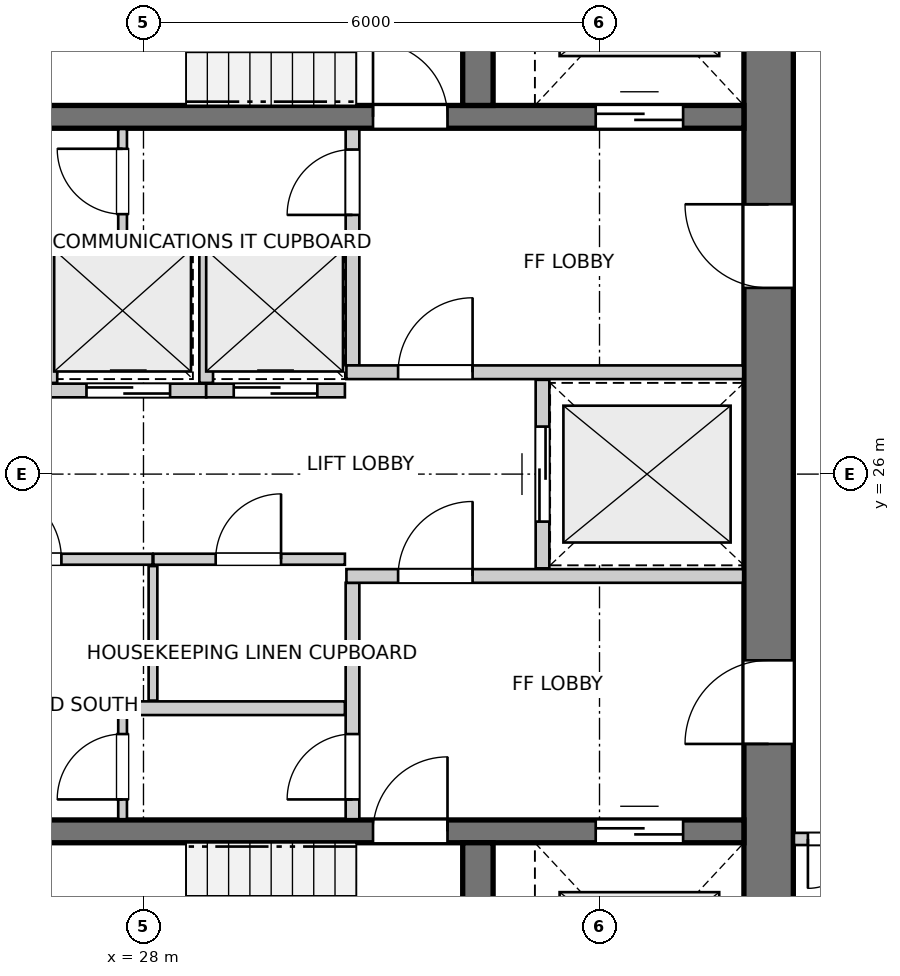
"""IFC4 building model, lengths in metres.
Left out: names, types, materials, properties, quantities, classifications, styles, units other than length and angle.
Written with IfcOpenShell. Run it as: python <this file> out.ifc"""

import sys

from ifc_helpers import new_model, si_unit, direction, frame, frame_2d, origin, place, context, subcontext, project, spatial, rectangle, extrude, source, transform, mapped, element, fill, save


model = new_model("IFC4")
c1 = context("Model", 3, precision=1e-05, world=origin(), true_north=direction((0.0, 1.0)))
c2 = subcontext(c1, "Body", "Model", "MODEL_VIEW")
j1 = project(units=[si_unit("LENGTHUNIT", "METRE"), si_unit("PLANEANGLEUNIT", "RADIAN")], contexts=[c1])
p1 = place(None, origin())
s1 = spatial("IfcSite", under=j1, at=p1, CompositionType="ELEMENT")
p2 = place(p1, origin())
s2 = spatial("IfcBuilding", under=s1, at=p2, CompositionType="ELEMENT")
p3 = place(p2, frame((0.0, 0.0, 142.6)))
s3 = spatial("IfcBuildingStorey", under=s2, at=p3, CompositionType="ELEMENT", Elevation=142.6)
p4 = place(p3, frame((36.225, 18.2, 0.0), z_axis=(0.0, 0.0, 1.0), x_axis=(0.0, 1.0, 0.0)))
e1 = element("IfcWall", 1, at=p4, inside=s3, PredefinedType="SHEAR", context=c2, shape_type="SweptSolid", body=[
    extrude(rectangle(XDim=15.6, YDim=0.65, at=frame_2d((7.8, 0.0))), origin(), (0.0, 0.0, 1.0), 2.95),
])
p5 = place(p4, frame((4.25, 0.0, 0.0)))
e2 = element("IfcOpeningElement", 2, at=p5, cuts=e1, PredefinedType="OPENING", context=c2, shape_type="SweptSolid", body=[
    extrude(rectangle(XDim=1.1, YDim=2.15, at=frame_2d((0.55, 1.075))), frame((0.0, 0.335, 0.0), z_axis=(0.0, -1.0, 0.0), x_axis=(1.0, 0.0, 0.0)), (0.0, 0.0, 1.0), 0.67),
])
p6 = place(p4, frame((10.25, 0.0, 0.0)))
e3 = element("IfcOpeningElement", 3, at=p6, cuts=e1, PredefinedType="OPENING", context=c2, shape_type="SweptSolid", body=[
    extrude(rectangle(XDim=1.1, YDim=2.15, at=frame_2d((0.55, 1.075))), frame((0.0, 0.335, 0.0), z_axis=(0.0, -1.0, 0.0), x_axis=(1.0, 0.0, 0.0)), (0.0, 0.0, 1.0), 0.67),
])
p7 = place(p3, frame((24.8, 21.3, 0.0), z_axis=(0.0, 0.0, 1.0), x_axis=(1.0, 0.0, 0.0)))
e4 = element("IfcWall", 4, at=p7, inside=s3, PredefinedType="SHEAR", context=c2, shape_type="SweptSolid", body=[
    extrude(rectangle(XDim=11.1, YDim=0.3, at=frame_2d((5.55, 0.0))), origin(), (0.0, 0.0, 1.0), 2.95),
])
p8 = place(p7, frame((6.22, 0.0, 0.0)))
e5 = element("IfcOpeningElement", 5, at=p8, cuts=e4, PredefinedType="OPENING", context=c2, shape_type="SweptSolid", body=[
    extrude(rectangle(XDim=0.98, YDim=2.15, at=frame_2d((0.49, 1.075))), frame((0.0, 0.16, 0.0), z_axis=(0.0, -1.0, 0.0), x_axis=(1.0, 0.0, 0.0)), (0.0, 0.0, 1.0), 0.32),
])
p9 = place(p7, frame((9.15, 0.0, 0.0)))
e6 = element("IfcOpeningElement", 6, at=p9, cuts=e4, PredefinedType="OPENING", context=c2, shape_type="SweptSolid", body=[
    extrude(rectangle(XDim=1.15, YDim=2.15, at=frame_2d((0.575, 1.075))), frame((0.0, 0.16, 0.0), z_axis=(0.0, -1.0, 0.0), x_axis=(1.0, 0.0, 0.0)), (0.0, 0.0, 1.0), 0.32),
])
p10 = place(p3, frame((32.4, 18.2, 0.0), z_axis=(0.0, 0.0, 1.0), x_axis=(0.0, 1.0, 0.0)))
e7 = element("IfcWall", 7, at=p10, inside=s3, PredefinedType="SHEAR", context=c2, shape_type="SweptSolid", body=[
    extrude(rectangle(XDim=2.95, YDim=0.4, at=frame_2d((1.475, 0.0))), origin(), (0.0, 0.0, 1.0), 2.95),
])
p11 = place(p3, frame((24.8, 30.7, 0.0), z_axis=(0.0, 0.0, 1.0), x_axis=(1.0, 0.0, 0.0)))
e8 = element("IfcWall", 8, at=p11, inside=s3, PredefinedType="SHEAR", context=c2, shape_type="SweptSolid", body=[
    extrude(rectangle(XDim=11.1, YDim=0.3, at=frame_2d((5.55, 0.0))), origin(), (0.0, 0.0, 1.0), 2.95),
])
p12 = place(p11, frame((6.22, 0.0, 0.0)))
e9 = element("IfcOpeningElement", 9, at=p12, cuts=e8, PredefinedType="OPENING", context=c2, shape_type="SweptSolid", body=[
    extrude(rectangle(XDim=0.98, YDim=2.15, at=frame_2d((0.49, 1.075))), frame((0.0, 0.16, 0.0), z_axis=(0.0, -1.0, 0.0), x_axis=(1.0, 0.0, 0.0)), (0.0, 0.0, 1.0), 0.32),
])
p13 = place(p11, frame((9.15, 0.0, 0.0)))
e10 = element("IfcOpeningElement", 10, at=p13, cuts=e8, PredefinedType="OPENING", context=c2, shape_type="SweptSolid", body=[
    extrude(rectangle(XDim=1.15, YDim=2.15, at=frame_2d((0.575, 1.075))), frame((0.0, 0.16, 0.0), z_axis=(0.0, -1.0, 0.0), x_axis=(1.0, 0.0, 0.0)), (0.0, 0.0, 1.0), 0.32),
])
p14 = place(p3, frame((32.4, 30.85, 0.0), z_axis=(0.0, 0.0, 1.0), x_axis=(0.0, 1.0, 0.0)))
e11 = element("IfcWall", 11, at=p14, inside=s3, PredefinedType="SHEAR", context=c2, shape_type="SweptSolid", body=[
    extrude(rectangle(XDim=2.95, YDim=0.4, at=frame_2d((1.475, 0.0))), origin(), (0.0, 0.0, 1.0), 2.95),
])
p15 = place(p3, frame((30.75, 21.46, 0.0), z_axis=(0.0, 0.0, 1.0), x_axis=(0.0, 1.0, 0.0)))
e12 = element("IfcWall", 12, at=p15, inside=s3, PredefinedType="PARTITIONING", context=c2, shape_type="SweptSolid", body=[
    extrude(rectangle(XDim=3.11, YDim=0.18, at=frame_2d((1.555, 0.0))), origin(), (0.0, 0.0, 1.0), 2.95),
])
p16 = place(p15, frame((0.26, 0.0, 0.0)))
e13 = element("IfcOpeningElement", 13, at=p16, cuts=e12, PredefinedType="OPENING", context=c2, shape_type="SweptSolid", body=[
    extrude(rectangle(XDim=0.86, YDim=2.05, at=frame_2d((0.43, 1.025))), frame((0.0, 0.1, 0.0), z_axis=(0.0, -1.0, 0.0), x_axis=(1.0, 0.0, 0.0)), (0.0, 0.0, 1.0), 0.2),
])
p17 = place(p3, frame((30.67, 24.66, 0.0), z_axis=(0.0, 0.0, 1.0), x_axis=(1.0, 0.0, 0.0)))
e14 = element("IfcWall", 14, at=p17, inside=s3, PredefinedType="PARTITIONING", context=c2, shape_type="SweptSolid", body=[
    extrude(rectangle(XDim=5.22, YDim=0.18, at=frame_2d((2.61, 0.0))), origin(), (0.0, 0.0, 1.0), 2.95),
])
p18 = place(p17, frame((0.68, 0.0, 0.0)))
e15 = element("IfcOpeningElement", 15, at=p18, cuts=e14, PredefinedType="OPENING", context=c2, shape_type="SweptSolid", body=[
    extrude(rectangle(XDim=0.98, YDim=2.15, at=frame_2d((0.49, 1.075))), frame((0.0, 0.1, 0.0), z_axis=(0.0, -1.0, 0.0), x_axis=(1.0, 0.0, 0.0)), (0.0, 0.0, 1.0), 0.2),
])
p19 = place(p3, frame((30.75, 27.43, 0.0), z_axis=(0.0, 0.0, 1.0), x_axis=(0.0, 1.0, 0.0)))
e16 = element("IfcWall", 16, at=p19, inside=s3, PredefinedType="PARTITIONING", context=c2, shape_type="SweptSolid", body=[
    extrude(rectangle(XDim=3.11, YDim=0.18, at=frame_2d((1.555, 0.0))), origin(), (0.0, 0.0, 1.0), 2.95),
])
p20 = place(p19, frame((1.98, 0.0, 0.0)))
e17 = element("IfcOpeningElement", 17, at=p20, cuts=e16, PredefinedType="OPENING", context=c2, shape_type="SweptSolid", body=[
    extrude(rectangle(XDim=0.86, YDim=2.05, at=frame_2d((0.43, 1.025))), frame((0.0, 0.1, 0.0), z_axis=(0.0, -1.0, 0.0), x_axis=(1.0, 0.0, 0.0)), (0.0, 0.0, 1.0), 0.2),
])
p21 = place(p3, frame((30.67, 27.34, 0.0), z_axis=(0.0, 0.0, 1.0), x_axis=(1.0, 0.0, 0.0)))
e18 = element("IfcWall", 18, at=p21, inside=s3, PredefinedType="PARTITIONING", context=c2, shape_type="SweptSolid", body=[
    extrude(rectangle(XDim=5.22, YDim=0.18, at=frame_2d((2.61, 0.0))), origin(), (0.0, 0.0, 1.0), 2.95),
])
p22 = place(p21, frame((0.68, 0.0, 0.0)))
e19 = element("IfcOpeningElement", 19, at=p22, cuts=e18, PredefinedType="OPENING", context=c2, shape_type="SweptSolid", body=[
    extrude(rectangle(XDim=0.98, YDim=2.15, at=frame_2d((0.49, 1.075))), frame((0.0, 0.1, 0.0), z_axis=(0.0, -1.0, 0.0), x_axis=(1.0, 0.0, 0.0)), (0.0, 0.0, 1.0), 0.2),
])
p23 = place(p3, frame((33.25, 24.76, 0.0), z_axis=(0.0, 0.0, 1.0), x_axis=(0.0, 1.0, 0.0)))
e20 = element("IfcWall", 20, at=p23, inside=s3, PredefinedType="PARTITIONING", context=c2, shape_type="SweptSolid", body=[
    extrude(rectangle(XDim=2.48, YDim=0.18, at=frame_2d((1.24, 0.0))), origin(), (0.0, 0.0, 1.0), 2.95),
])
p24 = place(p23, frame((0.615, 0.0, 0.0)))
e21 = element("IfcOpeningElement", 21, at=p24, cuts=e20, PredefinedType="OPENING", context=c2, shape_type="SweptSolid", body=[
    extrude(rectangle(XDim=1.25, YDim=2.15, at=frame_2d((0.625, 1.075))), frame((0.0, 0.1, 0.0), z_axis=(0.0, -1.0, 0.0), x_axis=(1.0, 0.0, 0.0)), (0.0, 0.0, 1.0), 0.2),
])
p25 = place(p3, frame((24.81, 22.92, 0.0), z_axis=(0.0, 0.0, 1.0), x_axis=(1.0, 0.0, 0.0)))
e22 = element("IfcWall", 22, at=p25, inside=s3, PredefinedType="PARTITIONING", context=c2, shape_type="SweptSolid", body=[
    extrude(rectangle(XDim=5.84, YDim=0.18, at=frame_2d((2.92, 0.0))), origin(), (0.0, 0.0, 1.0), 2.95),
])
p26 = place(p3, frame((24.81, 24.88, 0.0), z_axis=(0.0, 0.0, 1.0), x_axis=(1.0, 0.0, 0.0)))
e23 = element("IfcWall", 23, at=p26, inside=s3, PredefinedType="PARTITIONING", context=c2, shape_type="SweptSolid", body=[
    extrude(rectangle(XDim=3.31, YDim=0.145, at=frame_2d((1.655, 0.0))), origin(), (0.0, 0.0, 1.0), 2.95),
])
p27 = place(p26, frame((1.15, 0.0, 0.0)))
e24 = element("IfcOpeningElement", 24, at=p27, cuts=e23, PredefinedType="OPENING", context=c2, shape_type="SweptSolid", body=[
    extrude(rectangle(XDim=0.96, YDim=2.1, at=frame_2d((0.48, 1.05))), frame((0.0, 0.083, 0.0), z_axis=(0.0, -1.0, 0.0), x_axis=(1.0, 0.0, 0.0)), (0.0, 0.0, 1.0), 0.165),
])
p28 = place(p3, frame((28.13, 24.88, 0.0), z_axis=(0.0, 0.0, 1.0), x_axis=(1.0, 0.0, 0.0)))
e25 = element("IfcWall", 25, at=p28, inside=s3, PredefinedType="PARTITIONING", context=c2, shape_type="SweptSolid", body=[
    extrude(rectangle(XDim=2.52, YDim=0.145, at=frame_2d((1.26, 0.0))), origin(), (0.0, 0.0, 1.0), 2.95),
])
p29 = place(p28, frame((0.82, 0.0, 0.0)))
e26 = element("IfcOpeningElement", 26, at=p29, cuts=e25, PredefinedType="OPENING", context=c2, shape_type="SweptSolid", body=[
    extrude(rectangle(XDim=0.86, YDim=2.05, at=frame_2d((0.43, 1.025))), frame((0.0, 0.083, 0.0), z_axis=(0.0, -1.0, 0.0), x_axis=(1.0, 0.0, 0.0)), (0.0, 0.0, 1.0), 0.165),
])
p30 = place(p3, frame((28.125, 23.02, 0.0), z_axis=(0.0, 0.0, 1.0), x_axis=(0.0, 1.0, 0.0)))
e27 = element("IfcWall", 27, at=p30, inside=s3, PredefinedType="PARTITIONING", context=c2, shape_type="SweptSolid", body=[
    extrude(rectangle(XDim=1.77, YDim=0.115, at=frame_2d((0.885, 0.0))), origin(), (0.0, 0.0, 1.0), 2.95),
])
p31 = place(p3, frame((24.81, 29.08, 0.0), z_axis=(0.0, 0.0, 1.0), x_axis=(1.0, 0.0, 0.0)))
e28 = element("IfcWall", 28, at=p31, inside=s3, PredefinedType="PARTITIONING", context=c2, shape_type="SweptSolid", body=[
    extrude(rectangle(XDim=5.84, YDim=0.18, at=frame_2d((2.92, 0.0))), origin(), (0.0, 0.0, 1.0), 2.95),
])
p32 = place(p3, frame((26.775, 27.1, 0.0), z_axis=(0.0, 0.0, 1.0), x_axis=(1.0, 0.0, 0.0)))
e29 = element("IfcWall", 29, at=p32, inside=s3, PredefinedType="PARTITIONING", context=c2, shape_type="SweptSolid", body=[
    extrude(rectangle(XDim=2.05, YDim=0.18, at=frame_2d((1.025, 0.0))), origin(), (0.0, 0.0, 1.0), 2.95),
])
p33 = place(p32, frame((0.475, 0.0, 0.0)))
e30 = element("IfcOpeningElement", 30, at=p33, cuts=e29, PredefinedType="OPENING", context=c2, shape_type="SweptSolid", body=[
    extrude(rectangle(XDim=1.1, YDim=2.15, at=frame_2d((0.55, 1.075))), frame((0.0, 0.1, 0.0), z_axis=(0.0, -1.0, 0.0), x_axis=(1.0, 0.0, 0.0)), (0.0, 0.0, 1.0), 0.2),
])
p34 = place(p3, frame((26.775, 27.2, 0.0), z_axis=(0.0, 0.0, 1.0), x_axis=(0.0, 1.0, 0.0)))
e31 = element("IfcWall", 31, at=p34, inside=s3, PredefinedType="PARTITIONING", context=c2, shape_type="SweptSolid", body=[
    extrude(rectangle(XDim=1.78, YDim=0.18, at=frame_2d((0.89, 0.0))), origin(), (0.0, 0.0, 1.0), 2.95),
])
p35 = place(p3, frame((28.825, 27.1, 0.0), z_axis=(0.0, 0.0, 1.0), x_axis=(1.0, 0.0, 0.0)))
e32 = element("IfcWall", 32, at=p35, inside=s3, PredefinedType="PARTITIONING", context=c2, shape_type="SweptSolid", body=[
    extrude(rectangle(XDim=1.825, YDim=0.18, at=frame_2d((0.913, 0.0))), origin(), (0.0, 0.0, 1.0), 2.95),
])
p36 = place(p35, frame((0.363, 0.0, 0.0)))
e33 = element("IfcOpeningElement", 33, at=p36, cuts=e32, PredefinedType="OPENING", context=c2, shape_type="SweptSolid", body=[
    extrude(rectangle(XDim=1.1, YDim=2.15, at=frame_2d((0.55, 1.075))), frame((0.0, 0.1, 0.0), z_axis=(0.0, -1.0, 0.0), x_axis=(1.0, 0.0, 0.0)), (0.0, 0.0, 1.0), 0.2),
])
p37 = place(p3, frame((28.825, 27.2, 0.0), z_axis=(0.0, 0.0, 1.0), x_axis=(0.0, 1.0, 0.0)))
e34 = element("IfcWall", 34, at=p37, inside=s3, PredefinedType="PARTITIONING", context=c2, shape_type="SweptSolid", body=[
    extrude(rectangle(XDim=1.78, YDim=0.18, at=frame_2d((0.89, 0.0))), origin(), (0.0, 0.0, 1.0), 2.95),
])
p38 = place(p3, frame((27.725, 21.46, 0.0), z_axis=(0.0, 0.0, 1.0), x_axis=(0.0, 1.0, 0.0)))
e35 = element("IfcWall", 35, at=p38, inside=s3, PredefinedType="PARTITIONING", context=c2, shape_type="SweptSolid", body=[
    extrude(rectangle(XDim=1.38, YDim=0.115, at=frame_2d((0.69, 0.0))), origin(), (0.0, 0.0, 1.0), 2.95),
])
p39 = place(p38, frame((0.26, 0.0, 0.0)))
e36 = element("IfcOpeningElement", 36, at=p39, cuts=e35, PredefinedType="OPENING", context=c2, shape_type="SweptSolid", body=[
    extrude(rectangle(XDim=0.86, YDim=2.05, at=frame_2d((0.43, 1.025))), frame((0.0, 0.067, 0.0), z_axis=(0.0, -1.0, 0.0), x_axis=(1.0, 0.0, 0.0)), (0.0, 0.0, 1.0), 0.135),
])
p40 = place(p3, frame((27.725, 29.16, 0.0), z_axis=(0.0, 0.0, 1.0), x_axis=(0.0, 1.0, 0.0)))
e37 = element("IfcWall", 37, at=p40, inside=s3, PredefinedType="PARTITIONING", context=c2, shape_type="SweptSolid", body=[
    extrude(rectangle(XDim=1.38, YDim=0.115, at=frame_2d((0.69, 0.0))), origin(), (0.0, 0.0, 1.0), 2.95),
])
p41 = place(p40, frame((0.26, 0.0, 0.0)))
e38 = element("IfcOpeningElement", 38, at=p41, cuts=e37, PredefinedType="OPENING", context=c2, shape_type="SweptSolid", body=[
    extrude(rectangle(XDim=0.86, YDim=2.05, at=frame_2d((0.43, 1.025))), frame((0.0, 0.067, 0.0), z_axis=(0.0, -1.0, 0.0), x_axis=(1.0, 0.0, 0.0)), (0.0, 0.0, 1.0), 0.135),
])
p42 = place(p3, frame((38.242, 21.2, 0.0), z_axis=(0.0, 0.0, 1.0), x_axis=(-1.0, 0.0, 0.0)))
e39 = element("IfcWall", 39, at=p42, inside=s3, PredefinedType="PARTITIONING", context=c2, shape_type="SweptSolid", body=[
    extrude(rectangle(XDim=1.684, YDim=0.16, at=frame_2d((0.842, 0.0))), origin(), (0.0, 0.0, 1.0), 2.95),
])
p43 = place(p42, frame((0.2, 0.0, 0.0)))
e40 = element("IfcOpeningElement", 40, at=p43, cuts=e39, PredefinedType="OPENING", context=c2, shape_type="SweptSolid", body=[
    extrude(rectangle(XDim=1.3, YDim=2.1, at=frame_2d((0.65, 1.05))), frame((0.0, 0.09, 0.0), z_axis=(0.0, -1.0, 0.0), x_axis=(1.0, 0.0, 0.0)), (0.0, 0.0, 1.0), 0.18),
])
m1 = source(origin(), c2, "Body", "SweptSolid", [
    extrude(rectangle(XDim=0.98, YDim=2.15, at=frame_2d((0.49, 1.075))), frame((0.0, 0.025, 0.0), z_axis=(0.0, -1.0, 0.0), x_axis=(1.0, 0.0, 0.0)), (0.0, 0.0, 1.0), 0.05),
])
p44 = place(p8, origin())
e41 = element("IfcDoor", 41, at=p44, inside=s3, OperationType="SINGLE_SWING_RIGHT", PredefinedType="DOOR", context=c2, shape_type="MappedRepresentation", body=[
    mapped(m1, transform((0.0, 0.0, 0.0), x_axis=(1.0, 0.0, 0.0), y_axis=(0.0, 1.0, 0.0), z_axis=(0.0, 0.0, 1.0), scale=1.0)),
])
fill(e5, e41)
m2 = source(origin(), c2, "Body", "SweptSolid", [
    extrude(rectangle(XDim=1.15, YDim=2.15, at=frame_2d((0.575, 1.075))), frame((0.0, 0.025, 0.0), z_axis=(0.0, -1.0, 0.0), x_axis=(1.0, 0.0, 0.0)), (0.0, 0.0, 1.0), 0.05),
])
p45 = place(p9, origin())
e42 = element("IfcDoor", 42, at=p45, inside=s3, OperationType="DOUBLE_DOOR_SLIDING", PredefinedType="DOOR", context=c2, shape_type="MappedRepresentation", body=[
    mapped(m2, transform((0.0, 0.0, 0.0), x_axis=(1.0, 0.0, 0.0), y_axis=(0.0, 1.0, 0.0), z_axis=(0.0, 0.0, 1.0), scale=1.0)),
])
fill(e6, e42)
p46 = place(p12, origin())
e43 = element("IfcDoor", 43, at=p46, inside=s3, OperationType="SINGLE_SWING_LEFT", PredefinedType="DOOR", context=c2, shape_type="MappedRepresentation", body=[
    mapped(m1, transform((0.0, 0.0, 0.0), x_axis=(1.0, 0.0, 0.0), y_axis=(0.0, 1.0, 0.0), z_axis=(0.0, 0.0, 1.0), scale=1.0)),
])
fill(e9, e43)
p47 = place(p13, origin())
e44 = element("IfcDoor", 44, at=p47, inside=s3, OperationType="DOUBLE_DOOR_SLIDING", PredefinedType="DOOR", context=c2, shape_type="MappedRepresentation", body=[
    mapped(m2, transform((0.0, 0.0, 0.0), x_axis=(1.0, 0.0, 0.0), y_axis=(0.0, 1.0, 0.0), z_axis=(0.0, 0.0, 1.0), scale=1.0)),
])
fill(e10, e44)
m3 = source(origin(), c2, "Body", "SweptSolid", [
    extrude(rectangle(XDim=1.1, YDim=2.15, at=frame_2d((0.55, 1.075))), frame((0.0, 0.025, 0.0), z_axis=(0.0, -1.0, 0.0), x_axis=(1.0, 0.0, 0.0)), (0.0, 0.0, 1.0), 0.05),
])
p48 = place(p5, origin())
e45 = element("IfcDoor", 45, at=p48, inside=s3, OperationType="SINGLE_SWING_LEFT", PredefinedType="DOOR", context=c2, shape_type="MappedRepresentation", body=[
    mapped(m3, transform((0.0, 0.0, 0.0), x_axis=(1.0, 0.0, 0.0), y_axis=(0.0, 1.0, 0.0), z_axis=(0.0, 0.0, 1.0), scale=1.0)),
])
fill(e2, e45)
p49 = place(p6, origin())
e46 = element("IfcDoor", 46, at=p49, inside=s3, OperationType="SINGLE_SWING_RIGHT", PredefinedType="DOOR", context=c2, shape_type="MappedRepresentation", body=[
    mapped(m3, transform((0.0, 0.0, 0.0), x_axis=(1.0, 0.0, 0.0), y_axis=(0.0, 1.0, 0.0), z_axis=(0.0, 0.0, 1.0), scale=1.0)),
])
fill(e3, e46)
m4 = source(origin(), c2, "Body", "SweptSolid", [
    extrude(rectangle(XDim=0.86, YDim=2.05, at=frame_2d((0.43, 1.025))), frame((0.0, 0.025, 0.0), z_axis=(0.0, -1.0, 0.0), x_axis=(1.0, 0.0, 0.0)), (0.0, 0.0, 1.0), 0.05),
])
p50 = place(p16, origin())
e47 = element("IfcDoor", 47, at=p50, inside=s3, OperationType="SINGLE_SWING_LEFT", PredefinedType="DOOR", context=c2, shape_type="MappedRepresentation", body=[
    mapped(m4, transform((0.0, 0.0, 0.0), x_axis=(1.0, 0.0, 0.0), y_axis=(0.0, 1.0, 0.0), z_axis=(0.0, 0.0, 1.0), scale=1.0)),
])
fill(e13, e47)
p51 = place(p18, origin())
e48 = element("IfcDoor", 48, at=p51, inside=s3, OperationType="SINGLE_SWING_RIGHT", PredefinedType="DOOR", context=c2, shape_type="MappedRepresentation", body=[
    mapped(m1, transform((0.0, 0.0, 0.0), x_axis=(1.0, 0.0, 0.0), y_axis=(0.0, 1.0, 0.0), z_axis=(0.0, 0.0, 1.0), scale=1.0)),
])
fill(e15, e48)
p52 = place(p20, origin())
e49 = element("IfcDoor", 49, at=p52, inside=s3, OperationType="SINGLE_SWING_LEFT", PredefinedType="DOOR", context=c2, shape_type="MappedRepresentation", body=[
    mapped(m4, transform((0.0, 0.0, 0.0), x_axis=(1.0, 0.0, 0.0), y_axis=(0.0, 1.0, 0.0), z_axis=(0.0, 0.0, 1.0), scale=1.0)),
])
fill(e17, e49)
p53 = place(p22, origin())
e50 = element("IfcDoor", 50, at=p53, inside=s3, OperationType="SINGLE_SWING_RIGHT", PredefinedType="DOOR", context=c2, shape_type="MappedRepresentation", body=[
    mapped(m1, transform((0.0, 0.0, 0.0), x_axis=(1.0, 0.0, 0.0), y_axis=(0.0, 1.0, 0.0), z_axis=(0.0, 0.0, 1.0), scale=1.0)),
])
fill(e19, e50)
m5 = source(origin(), c2, "Body", "SweptSolid", [
    extrude(rectangle(XDim=1.25, YDim=2.15, at=frame_2d((0.625, 1.075))), frame((0.0, 0.025, 0.0), z_axis=(0.0, -1.0, 0.0), x_axis=(1.0, 0.0, 0.0)), (0.0, 0.0, 1.0), 0.05),
])
p54 = place(p24, origin())
e51 = element("IfcDoor", 51, at=p54, inside=s3, OperationType="DOUBLE_DOOR_SLIDING", PredefinedType="DOOR", context=c2, shape_type="MappedRepresentation", body=[
    mapped(m5, transform((0.0, 0.0, 0.0), x_axis=(1.0, 0.0, 0.0), y_axis=(0.0, 1.0, 0.0), z_axis=(0.0, 0.0, 1.0), scale=1.0)),
])
fill(e21, e51)
m6 = source(origin(), c2, "Body", "SweptSolid", [
    extrude(rectangle(XDim=0.96, YDim=2.1, at=frame_2d((0.48, 1.05))), frame((0.0, 0.025, 0.0), z_axis=(0.0, -1.0, 0.0), x_axis=(1.0, 0.0, 0.0)), (0.0, 0.0, 1.0), 0.05),
])
p55 = place(p27, origin())
e52 = element("IfcDoor", 52, at=p55, inside=s3, OperationType="SINGLE_SWING_LEFT", PredefinedType="DOOR", context=c2, shape_type="MappedRepresentation", body=[
    mapped(m6, transform((0.0, 0.0, 0.0), x_axis=(1.0, 0.0, 0.0), y_axis=(0.0, 1.0, 0.0), z_axis=(0.0, 0.0, 1.0), scale=1.0)),
])
fill(e24, e52)
p56 = place(p29, origin())
e53 = element("IfcDoor", 53, at=p56, inside=s3, OperationType="SINGLE_SWING_RIGHT", PredefinedType="DOOR", context=c2, shape_type="MappedRepresentation", body=[
    mapped(m4, transform((0.0, 0.0, 0.0), x_axis=(1.0, 0.0, 0.0), y_axis=(0.0, 1.0, 0.0), z_axis=(0.0, 0.0, 1.0), scale=1.0)),
])
fill(e26, e53)
p57 = place(p33, origin())
e54 = element("IfcDoor", 54, at=p57, inside=s3, OperationType="DOUBLE_DOOR_SLIDING", PredefinedType="DOOR", context=c2, shape_type="MappedRepresentation", body=[
    mapped(m3, transform((0.0, 0.0, 0.0), x_axis=(1.0, 0.0, 0.0), y_axis=(0.0, 1.0, 0.0), z_axis=(0.0, 0.0, 1.0), scale=1.0)),
])
fill(e30, e54)
p58 = place(p36, origin())
e55 = element("IfcDoor", 55, at=p58, inside=s3, OperationType="DOUBLE_DOOR_SLIDING", PredefinedType="DOOR", context=c2, shape_type="MappedRepresentation", body=[
    mapped(m3, transform((0.0, 0.0, 0.0), x_axis=(1.0, 0.0, 0.0), y_axis=(0.0, 1.0, 0.0), z_axis=(0.0, 0.0, 1.0), scale=1.0)),
])
fill(e33, e55)
p59 = place(p39, origin())
e56 = element("IfcDoor", 56, at=p59, inside=s3, OperationType="SINGLE_SWING_LEFT", PredefinedType="DOOR", context=c2, shape_type="MappedRepresentation", body=[
    mapped(m4, transform((0.0, 0.0, 0.0), x_axis=(1.0, 0.0, 0.0), y_axis=(0.0, 1.0, 0.0), z_axis=(0.0, 0.0, 1.0), scale=1.0)),
])
fill(e36, e56)
p60 = place(p41, origin())
e57 = element("IfcDoor", 57, at=p60, inside=s3, OperationType="SINGLE_SWING_RIGHT", PredefinedType="DOOR", context=c2, shape_type="MappedRepresentation", body=[
    mapped(m4, transform((0.0, 0.0, 0.0), x_axis=(1.0, 0.0, 0.0), y_axis=(0.0, 1.0, 0.0), z_axis=(0.0, 0.0, 1.0), scale=1.0)),
])
fill(e38, e57)
m7 = source(origin(), c2, "Body", "SweptSolid", [
    extrude(rectangle(XDim=1.3, YDim=2.1, at=frame_2d((0.65, 1.05))), frame((0.0, 0.025, 0.0), z_axis=(0.0, -1.0, 0.0), x_axis=(1.0, 0.0, 0.0)), (0.0, 0.0, 1.0), 0.05),
])
p61 = place(p43, origin())
e58 = element("IfcDoor", 58, at=p61, inside=s3, OperationType="DOUBLE_DOOR_SINGLE_SWING", PredefinedType="DOOR", context=c2, shape_type="MappedRepresentation", body=[
    mapped(m7, transform((0.0, 0.0, 0.0), x_axis=(1.0, 0.0, 0.0), y_axis=(0.0, 1.0, 0.0), z_axis=(0.0, 0.0, 1.0), scale=1.0)),
])
fill(e40, e58)
save(model, sys.argv[1])
